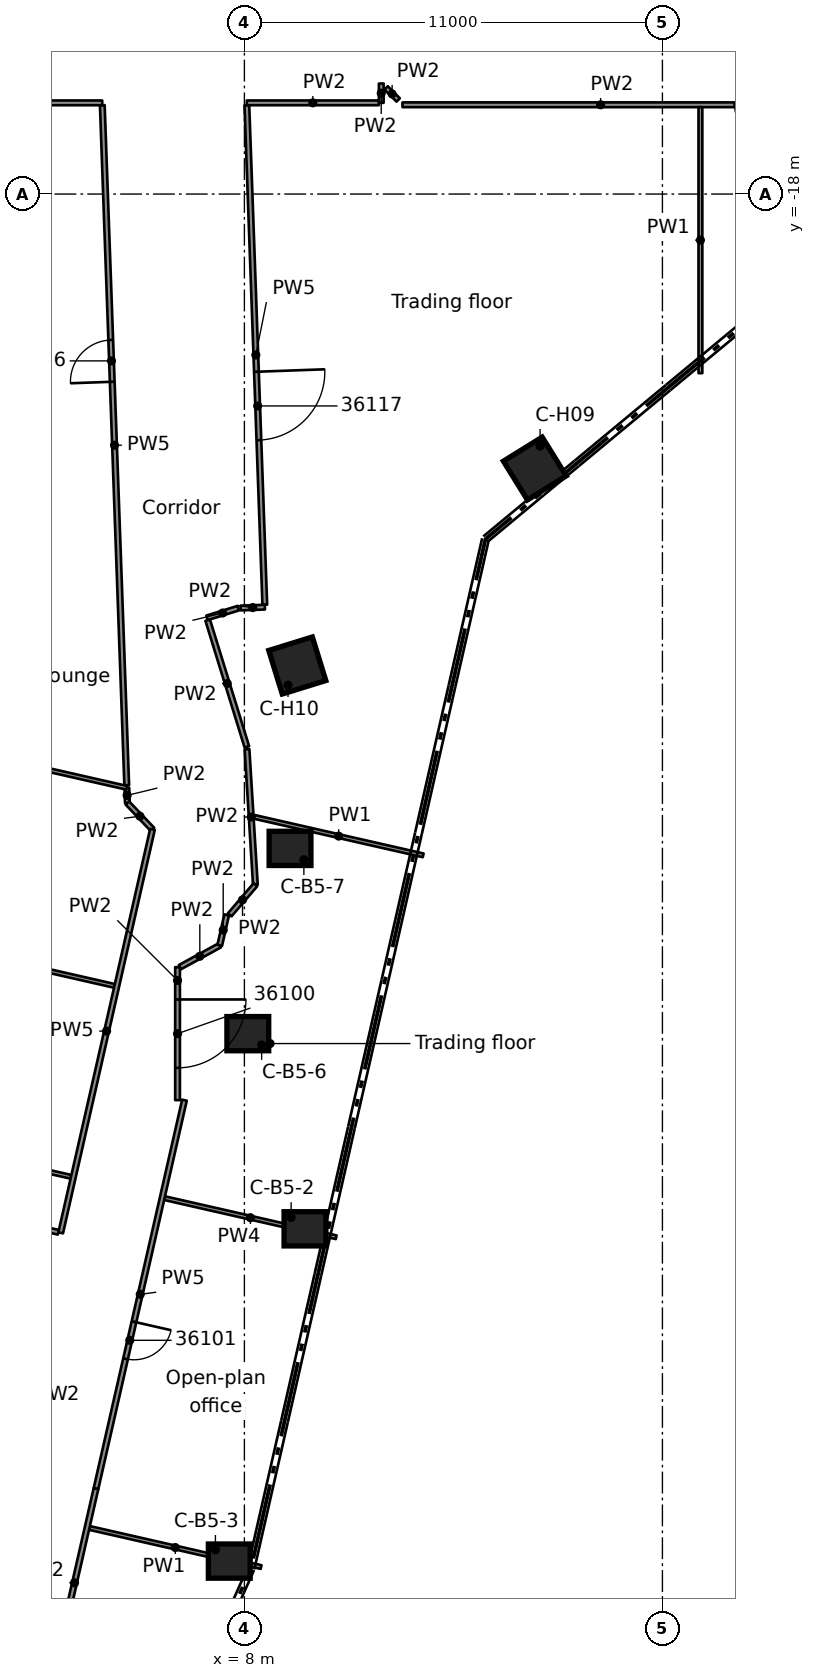
"""IFC4 building model, lengths in metres.
Left out: names, types, materials, properties, quantities, classifications, styles, units other than length and angle.
Written with IfcOpenShell. Run it as: python <this file> out.ifc"""

import sys

from ifc_helpers import new_model, si_unit, direction, frame, frame_2d, origin, origin_2d, place, context, subcontext, project, spatial, rectangle, extrude, element, fill, save


model = new_model("IFC4")
c1 = context("Model", 3, precision=1e-05, world=origin(), true_north=direction((0.0, 1.0)))
c2 = subcontext(c1, "Body", "Model", "MODEL_VIEW")
j1 = project(units=[si_unit("LENGTHUNIT", "METRE"), si_unit("PLANEANGLEUNIT", "RADIAN")], contexts=[c1])
p1 = place(None, origin())
s1 = spatial("IfcSite", under=j1, at=p1, CompositionType="ELEMENT")
p2 = place(p1, origin())
s2 = spatial("IfcBuilding", under=s1, at=p2, CompositionType="ELEMENT")
p3 = place(p2, frame((0.0, 0.0, 181.1)))
s3 = spatial("IfcBuildingStorey", under=s2, at=p3, CompositionType="ELEMENT", Elevation=181.1)
for number, where, z_axis, x_axis in (
    (1, (9.594, -45.227, 0.0), (0.0, 0.0, 1.0), (1.0, 0.0, 0.0)),
    (2, (7.602, -53.97, 0.0), (0.0, 0.0, 1.0), (1.0, 0.0, 0.0)),
    (3, (8.09, -40.092, 0.0), (0.0, 0.0, 1.0), (1.0, 0.0, 0.0)),
    (4, (9.201, -35.217, 0.0), (0.0, 0.0, 1.0), (1.0, 0.0, 0.0)),
):
    element("IfcColumn", number, at=place(p3, frame(where, z_axis=z_axis, x_axis=x_axis)), inside=s3, PredefinedType="COLUMN", context=c2, shape_type="SweptSolid", body=[
        extrude(rectangle(XDim=1.1, YDim=0.9, at=origin_2d()), origin(), (0.0, 0.0, 1.0), 3.5),
    ])
for number, where, z_axis, x_axis in (
    (5, (15.642, -25.222, 0.0), (0.0, 0.0, 1.0), (0.527, -0.85, 0.0)),
    (6, (9.392, -30.405, 0.0), (0.0, 0.0, 1.0), (0.295, -0.955, 0.0)),
):
    element("IfcColumn", number, at=place(p3, frame(where, z_axis=z_axis, x_axis=x_axis)), inside=s3, PredefinedType="COLUMN", context=c2, shape_type="SweptSolid", body=[
        extrude(rectangle(XDim=1.2, YDim=1.2, at=origin_2d()), origin(), (0.0, 0.0, 1.0), 3.5),
    ])
p4 = place(p3, frame((4.907, -33.623, 0.0), z_axis=(0.0, 0.0, 1.0), x_axis=(0.034692866757, -0.999398021309, 0.0)))
e7 = element("IfcWall", 7, at=p4, inside=s3, PredefinedType="PARTITIONING", context=c2, shape_type="SweptSolid", body=[
    extrude(rectangle(XDim=0.401, YDim=0.125, at=frame_2d((0.201, 0.0))), origin(), (0.0, 0.0, 1.0), 3.06),
])
p5 = place(p3, frame((4.904, -33.555, 0.0), z_axis=(0.0, 0.0, 1.0), x_axis=(-0.035916720211, 0.999354786454, 0.0)))
e8 = element("IfcWall", 8, at=p5, inside=s3, PredefinedType="PARTITIONING", context=c2, shape_type="SweptSolid", body=[
    extrude(rectangle(XDim=17.904, YDim=0.125, at=frame_2d((8.952, 0.0))), origin(), (0.0, 0.0, 1.0), 2.425),
])
p6 = place(p5, frame((10.623, 0.0, 0.0)))
e9 = element("IfcOpeningElement", 9, at=p6, cuts=e8, PredefinedType="OPENING", context=c2, shape_type="SweptSolid", body=[
    extrude(rectangle(XDim=1.1, YDim=2.1, at=frame_2d((0.55, 1.05))), frame((0.0, 0.073, 0.0), z_axis=(0.0, -1.0, 0.0), x_axis=(1.0, 0.0, 0.0)), (0.0, 0.0, 1.0), 0.145),
])
p7 = place(p3, frame((8.065, -15.662, 0.0), z_axis=(0.0, 0.0, 1.0), x_axis=(0.035900093104, -0.999355383893, 0.0)))
e10 = element("IfcWall", 10, at=p7, inside=s3, PredefinedType="PARTITIONING", context=c2, shape_type="SweptSolid", body=[
    extrude(rectangle(XDim=13.152, YDim=0.125, at=frame_2d((6.576, 0.0))), origin(), (0.0, 0.0, 1.0), 2.425),
])
p8 = place(p7, frame((7.018, 0.0, 0.0)))
e11 = element("IfcOpeningElement", 11, at=p8, cuts=e10, PredefinedType="OPENING", context=c2, shape_type="SweptSolid", body=[
    extrude(rectangle(XDim=1.8, YDim=2.1, at=frame_2d((0.9, 1.05))), frame((0.0, 0.073, 0.0), z_axis=(0.0, -1.0, 0.0), x_axis=(1.0, 0.0, 0.0)), (0.0, 0.0, 1.0), 0.145),
])
p9 = place(p3, frame((8.069, -32.609, 0.0), z_axis=(0.0, 0.0, 1.0), x_axis=(0.061565744527, -0.998103030303, 0.0)))
e12 = element("IfcWall", 12, at=p9, inside=s3, PredefinedType="PARTITIONING", context=c2, shape_type="SweptSolid", body=[
    extrude(rectangle(XDim=3.573, YDim=0.125, at=frame_2d((1.787, 0.0))), origin(), (0.0, 0.0, 1.0), 3.06),
])
p10 = place(p3, frame((7.034, -29.211, 0.0), z_axis=(0.0, 0.0, 1.0), x_axis=(0.295358504145, -0.955386494582, 0.0)))
e13 = element("IfcWall", 13, at=p10, inside=s3, PredefinedType="PARTITIONING", context=c2, shape_type="SweptSolid", body=[
    extrude(rectangle(XDim=3.491, YDim=0.125, at=frame_2d((1.745, 0.0))), origin(), (0.0, 0.0, 1.0), 3.06),
])
p11 = place(p3, frame((11.729, -15.207, 0.0), z_axis=(0.0, 0.0, 1.0), x_axis=(0.707106781187, -0.707106781187, 0.0)))
e14 = element("IfcWall", 14, at=p11, inside=s3, PredefinedType="PARTITIONING", context=c2, shape_type="SweptSolid", body=[
    extrude(rectangle(XDim=0.448, YDim=0.125, at=frame_2d((0.224, 0.0))), origin(), (0.0, 0.0, 1.0), 3.06),
])
p12 = place(p3, frame((3.923, -53.098, 0.0), z_axis=(0.0, 0.0, 1.0), x_axis=(0.975005836175, -0.222179250661, 0.0)))
e15 = element("IfcWall", 15, at=p12, inside=s3, PredefinedType="PARTITIONING", context=c2, shape_type="SweptSolid", body=[
    extrude(rectangle(XDim=4.632, YDim=0.1, at=frame_2d((2.316, 0.0))), origin(), (0.0, 0.0, 1.0), 3.06),
])
p13 = place(p3, frame((0.991, -44.837, 0.0), z_axis=(0.0, 0.0, 1.0), x_axis=(0.97505868901, -0.22194718513, 0.0)))
e16 = element("IfcWall", 16, at=p13, inside=s3, PredefinedType="PARTITIONING", context=c2, shape_type="SweptSolid", body=[
    extrude(rectangle(XDim=2.168, YDim=0.125, at=frame_2d((1.084, 0.0))), origin(), (0.0, 0.0, 1.0), 2.425),
])
p14 = place(p3, frame((-22.095, -38.043, 0.0), z_axis=(0.0, 0.0, 1.0), x_axis=(0.975023843859, -0.222100211404, 0.0)))
e17 = element("IfcWall", 17, at=p14, inside=s3, PredefinedType="PARTITIONING", context=c2, shape_type="SweptSolid", body=[
    extrude(rectangle(XDim=26.186, YDim=0.1, at=frame_2d((13.093, 0.0))), origin(), (0.0, 0.0, 1.0), 2.425),
])
p15 = place(p3, frame((5.9, -44.42, 0.0), z_axis=(0.0, 0.0, 1.0), x_axis=(0.975008438008, -0.222167832534, 0.0)))
e18 = element("IfcWall", 18, at=p15, inside=s3, PredefinedType="PARTITIONING", context=c2, shape_type="SweptSolid", body=[
    extrude(rectangle(XDim=4.632, YDim=0.1, at=frame_2d((2.316, 0.0))), origin(), (0.0, 0.0, 1.0), 2.425),
])
p16 = place(p3, frame((-20.951, -33.019, 0.0), z_axis=(0.0, 0.0, 1.0), x_axis=(0.975025683381, -0.222092135715, 0.0)))
e19 = element("IfcWall", 19, at=p16, inside=s3, PredefinedType="PARTITIONING", context=c2, shape_type="SweptSolid", body=[
    extrude(rectangle(XDim=26.187, YDim=0.1, at=frame_2d((13.094, 0.0))), origin(), (0.0, 0.0, 1.0), 3.06),
])
p17 = place(p3, frame((-19.806, -27.994, 0.0), z_axis=(0.0, 0.0, 1.0), x_axis=(0.975023541408, -0.222101539165, 0.0)))
e20 = element("IfcWall", 20, at=p17, inside=s3, PredefinedType="PARTITIONING", context=c2, shape_type="SweptSolid", body=[
    extrude(rectangle(XDim=25.345, YDim=0.1, at=frame_2d((12.672, 0.0))), origin(), (0.0, 0.0, 1.0), 3.06),
])
p18 = place(p3, frame((8.256, -34.387, 0.0), z_axis=(0.0, 0.0, 1.0), x_axis=(0.975047109618, -0.221998049597, 0.0)))
e21 = element("IfcWall", 21, at=p18, inside=s3, PredefinedType="PARTITIONING", context=c2, shape_type="SweptSolid", body=[
    extrude(rectangle(XDim=4.563, YDim=0.1, at=frame_2d((2.281, 0.0))), origin(), (0.0, 0.0, 1.0), 3.06),
])
p19 = place(p3, frame((6.303, -38.342, 0.0), z_axis=(0.0, 0.0, 1.0), x_axis=(0.877434318746, 0.479696796202, 0.0)))
e22 = element("IfcWall", 22, at=p19, inside=s3, PredefinedType="PARTITIONING", context=c2, shape_type="SweptSolid", body=[
    extrude(rectangle(XDim=1.195, YDim=0.125, at=frame_2d((0.597, 0.0))), origin(), (0.0, 0.0, 1.0), 3.06),
])
p20 = place(p3, frame((22.587, -15.651, 0.0), z_axis=(0.0, 0.0, 1.0), x_axis=(-1.0, 0.0, 0.0)))
e23 = element("IfcWall", 23, at=p20, inside=s3, PredefinedType="PARTITIONING", context=c2, shape_type="SweptSolid", body=[
    extrude(rectangle(XDim=10.427, YDim=0.125, at=frame_2d((5.213, 0.0))), origin(), (0.0, 0.0, 1.0), 3.06),
])
p21 = place(p20, frame((0.788, 0.0, 0.0)))
e24 = element("IfcOpeningElement", 24, at=p21, cuts=e23, PredefinedType="OPENING", context=c2, shape_type="SweptSolid", body=[
    extrude(rectangle(XDim=0.9, YDim=2.1, at=frame_2d((0.45, 1.05))), frame((0.0, 0.073, 0.0), z_axis=(0.0, -1.0, 0.0), x_axis=(1.0, 0.0, 0.0)), (0.0, 0.0, 1.0), 0.145),
])
p22 = place(p3, frame((4.259, -15.6, 0.0), z_axis=(0.0, 0.0, 1.0), x_axis=(-1.0, 0.0, 0.0)))
e25 = element("IfcWall", 25, at=p22, inside=s3, PredefinedType="PARTITIONING", context=c2, shape_type="SweptSolid", body=[
    extrude(rectangle(XDim=15.859, YDim=0.125, at=frame_2d((7.93, 0.0))), origin(), (0.0, 0.0, 1.0), 3.06),
])
p23 = place(p22, frame((12.609, 0.0, 0.0)))
e26 = element("IfcOpeningElement", 26, at=p23, cuts=e25, PredefinedType="OPENING", context=c2, shape_type="SweptSolid", body=[
    extrude(rectangle(XDim=0.9, YDim=2.1, at=frame_2d((0.45, 1.05))), frame((0.0, 0.073, 0.0), z_axis=(0.0, -1.0, 0.0), x_axis=(1.0, 0.0, 0.0)), (0.0, 0.0, 1.0), 0.145),
])
p24 = place(p22, frame((6.859, 0.0, 0.0)))
e27 = element("IfcOpeningElement", 27, at=p24, cuts=e25, PredefinedType="OPENING", context=c2, shape_type="SweptSolid", body=[
    extrude(rectangle(XDim=0.9, YDim=2.1, at=frame_2d((0.45, 1.05))), frame((0.0, 0.073, 0.0), z_axis=(0.0, -1.0, 0.0), x_axis=(1.0, 0.0, 0.0)), (0.0, 0.0, 1.0), 0.145),
])
p25 = place(p22, frame((1.6, 0.0, 0.0)))
e28 = element("IfcOpeningElement", 28, at=p25, cuts=e25, PredefinedType="OPENING", context=c2, shape_type="SweptSolid", body=[
    extrude(rectangle(XDim=1.1, YDim=2.1, at=frame_2d((0.55, 1.05))), frame((0.0, 0.073, 0.0), z_axis=(0.0, -1.0, 0.0), x_axis=(1.0, 0.0, 0.0)), (0.0, 0.0, 1.0), 0.145),
])
p26 = place(p3, frame((8.063, -15.6, 0.0), z_axis=(0.0, 0.0, 1.0), x_axis=(1.0, 0.0, 0.0)))
e29 = element("IfcWall", 29, at=p26, inside=s3, PredefinedType="PARTITIONING", context=c2, shape_type="SweptSolid", body=[
    extrude(rectangle(XDim=3.476, YDim=0.125, at=frame_2d((1.738, 0.0))), origin(), (0.0, 0.0, 1.0), 3.06),
])
p27 = place(p3, frame((7.613, -36.966, 0.0), z_axis=(0.0, 0.0, 1.0), x_axis=(0.649689309886, 0.760199842554, 0.0)))
e30 = element("IfcWall", 30, at=p27, inside=s3, PredefinedType="PARTITIONING", context=c2, shape_type="SweptSolid", body=[
    extrude(rectangle(XDim=1.041, YDim=0.125, at=frame_2d((0.52, 0.0))), origin(), (0.0, 0.0, 1.0), 3.06),
])
p28 = place(p3, frame((7.902, -28.892, 0.0), z_axis=(0.0, 0.0, 1.0), x_axis=(0.999337726379, 0.036388303567, 0.0)))
e31 = element("IfcWall", 31, at=p28, inside=s3, PredefinedType="PARTITIONING", context=c2, shape_type="SweptSolid", body=[
    extrude(rectangle(XDim=0.637, YDim=0.125, at=frame_2d((0.319, 0.0))), origin(), (0.0, 0.0, 1.0), 3.06),
])
p29 = place(p3, frame((4.922, -34.024, 0.0), z_axis=(0.0, 0.0, 1.0), x_axis=(0.689011074604, -0.724750811709, 0.0)))
e32 = element("IfcWall", 32, at=p29, inside=s3, PredefinedType="PARTITIONING", context=c2, shape_type="SweptSolid", body=[
    extrude(rectangle(XDim=0.956, YDim=0.125, at=frame_2d((0.478, 0.0))), origin(), (0.0, 0.0, 1.0), 3.06),
])
p30 = place(p3, frame((7.016, -29.151, 0.0), z_axis=(0.0, 0.0, 1.0), x_axis=(0.955337275677, 0.295517663943, 0.0)))
e33 = element("IfcWall", 33, at=p30, inside=s3, PredefinedType="PARTITIONING", context=c2, shape_type="SweptSolid", body=[
    extrude(rectangle(XDim=0.863, YDim=0.125, at=frame_2d((0.431, 0.0))), origin(), (0.0, 0.0, 1.0), 3.06),
])
p31 = place(p3, frame((4.096, -52.059, 0.0), z_axis=(0.0, 0.0, 1.0), x_axis=(-0.222267590123, -0.974985701629, 0.0)))
e34 = element("IfcWall", 34, at=p31, inside=s3, PredefinedType="PARTITIONING", context=c2, shape_type="SweptSolid", body=[
    extrude(rectangle(XDim=5.092, YDim=0.125, at=frame_2d((2.546, 0.0))), origin(), (0.0, 0.0, 1.0), 3.06),
])
p32 = place(p3, frame((6.423, -41.842, 0.0), z_axis=(0.0, 0.0, 1.0), x_axis=(-0.222083299456, -0.97502769607, 0.0)))
e35 = element("IfcWall", 35, at=p32, inside=s3, PredefinedType="PARTITIONING", context=c2, shape_type="SweptSolid", body=[
    extrude(rectangle(XDim=10.479, YDim=0.125, at=frame_2d((5.239, 0.0))), origin(), (0.0, 0.0, 1.0), 2.425),
])
p33 = place(p32, frame((5.98, 0.0, 0.0)))
e36 = element("IfcOpeningElement", 36, at=p33, cuts=e35, PredefinedType="OPENING", context=c2, shape_type="SweptSolid", body=[
    extrude(rectangle(XDim=1.0, YDim=2.1, at=frame_2d((0.5, 1.05))), frame((0.0, 0.073, 0.0), z_axis=(0.0, -1.0, 0.0), x_axis=(1.0, 0.0, 0.0)), (0.0, 0.0, 1.0), 0.145),
])
p34 = place(p3, frame((7.351, -37.769, 0.0), z_axis=(0.0, 0.0, 1.0), x_axis=(0.222043922605, 0.975036664149, 0.0)))
e37 = element("IfcWall", 37, at=p34, inside=s3, PredefinedType="PARTITIONING", context=c2, shape_type="SweptSolid", body=[
    extrude(rectangle(XDim=0.823, YDim=0.125, at=frame_2d((0.412, 0.0))), origin(), (0.0, 0.0, 1.0), 3.06),
])
p35 = place(p3, frame((3.166, -45.332, 0.0), z_axis=(0.0, 0.0, 1.0), x_axis=(0.221843071865, 0.975082381887, 0.0)))
e38 = element("IfcWall", 38, at=p35, inside=s3, PredefinedType="PARTITIONING", context=c2, shape_type="SweptSolid", body=[
    extrude(rectangle(XDim=10.886, YDim=0.125, at=frame_2d((5.443, 0.0))), origin(), (0.0, 0.0, 1.0), 2.425),
])
p36 = place(p3, frame((20.0, -22.713, 0.0), z_axis=(0.0, 0.0, 1.0), x_axis=(0.0, 1.0, 0.0)))
e39 = element("IfcWall", 39, at=p36, inside=s3, PredefinedType="PARTITIONING", context=c2, shape_type="SweptSolid", body=[
    extrude(rectangle(XDim=7.0, YDim=0.1, at=frame_2d((3.5, 0.0))), origin(), (0.0, 0.0, 1.0), 3.06),
])
p37 = place(p3, frame((11.601, -15.6, 0.0), z_axis=(0.0, 0.0, 1.0), x_axis=(0.0, 1.0, 0.0)))
e40 = element("IfcWall", 40, at=p37, inside=s3, PredefinedType="PARTITIONING", context=c2, shape_type="SweptSolid", body=[
    extrude(rectangle(XDim=0.508, YDim=0.125, at=frame_2d((0.254, 0.0))), origin(), (0.0, 0.0, 1.0), 3.06),
])
p38 = place(p3, frame((6.241, -38.342, 0.0), z_axis=(0.0, 0.0, 1.0), x_axis=(0.0, -1.0, 0.0)))
e41 = element("IfcWall", 41, at=p38, inside=s3, PredefinedType="PARTITIONING", context=c2, shape_type="SweptSolid", body=[
    extrude(rectangle(XDim=3.499, YDim=0.125, at=frame_2d((1.75, 0.0))), origin(), (0.0, 0.0, 1.0), 3.06),
])
p39 = place(p38, frame((0.85, 0.0, 0.0)))
e42 = element("IfcOpeningElement", 42, at=p39, cuts=e41, PredefinedType="OPENING", context=c2, shape_type="SweptSolid", body=[
    extrude(rectangle(XDim=1.8, YDim=2.1, at=frame_2d((0.9, 1.05))), frame((0.0, 0.073, 0.0), z_axis=(0.0, -1.0, 0.0), x_axis=(1.0, 0.0, 0.0)), (0.0, 0.0, 1.0), 0.145),
])
p40 = place(p39, origin())
e43 = element("IfcDoor", 43, at=p40, inside=s3, OperationType="DOUBLE_DOOR_SINGLE_SWING", PredefinedType="DOOR", context=c2, shape_type="SweptSolid", body=[
    extrude(rectangle(XDim=1.8, YDim=2.1, at=frame_2d((0.9, 1.05))), frame((0.0, 0.025, 0.0), z_axis=(0.0, -1.0, 0.0), x_axis=(1.0, 0.0, 0.0)), (0.0, 0.0, 1.0), 0.05),
])
fill(e42, e43)
p41 = place(p33, origin())
e44 = element("IfcDoor", 44, at=p41, inside=s3, OperationType="SINGLE_SWING_RIGHT", PredefinedType="DOOR", context=c2, shape_type="SweptSolid", body=[
    extrude(rectangle(XDim=1.0, YDim=2.1, at=frame_2d((0.5, 1.05))), frame((0.0, 0.025, 0.0), z_axis=(0.0, -1.0, 0.0), x_axis=(1.0, 0.0, 0.0)), (0.0, 0.0, 1.0), 0.05),
])
fill(e36, e44)
p42 = place(p6, origin())
e45 = element("IfcDoor", 45, at=p42, inside=s3, OperationType="SINGLE_SWING_RIGHT", PredefinedType="DOOR", context=c2, shape_type="SweptSolid", body=[
    extrude(rectangle(XDim=1.1, YDim=2.1, at=frame_2d((0.55, 1.05))), frame((0.0, 0.025, 0.0), z_axis=(0.0, -1.0, 0.0), x_axis=(1.0, 0.0, 0.0)), (0.0, 0.0, 1.0), 0.05),
])
fill(e9, e45)
p43 = place(p8, origin())
e46 = element("IfcDoor", 46, at=p43, inside=s3, OperationType="DOUBLE_DOOR_SINGLE_SWING", PredefinedType="DOOR", context=c2, shape_type="SweptSolid", body=[
    extrude(rectangle(XDim=1.8, YDim=2.1, at=frame_2d((0.9, 1.05))), frame((0.0, 0.025, 0.0), z_axis=(0.0, -1.0, 0.0), x_axis=(1.0, 0.0, 0.0)), (0.0, 0.0, 1.0), 0.05),
])
fill(e11, e46)
p44 = place(p21, origin())
e47 = element("IfcDoor", 47, at=p44, inside=s3, OperationType="SINGLE_SWING_LEFT", PredefinedType="DOOR", context=c2, shape_type="SweptSolid", body=[
    extrude(rectangle(XDim=0.9, YDim=2.1, at=frame_2d((0.45, 1.05))), frame((0.0, 0.025, 0.0), z_axis=(0.0, -1.0, 0.0), x_axis=(1.0, 0.0, 0.0)), (0.0, 0.0, 1.0), 0.05),
])
fill(e24, e47)
save(model, sys.argv[1])
